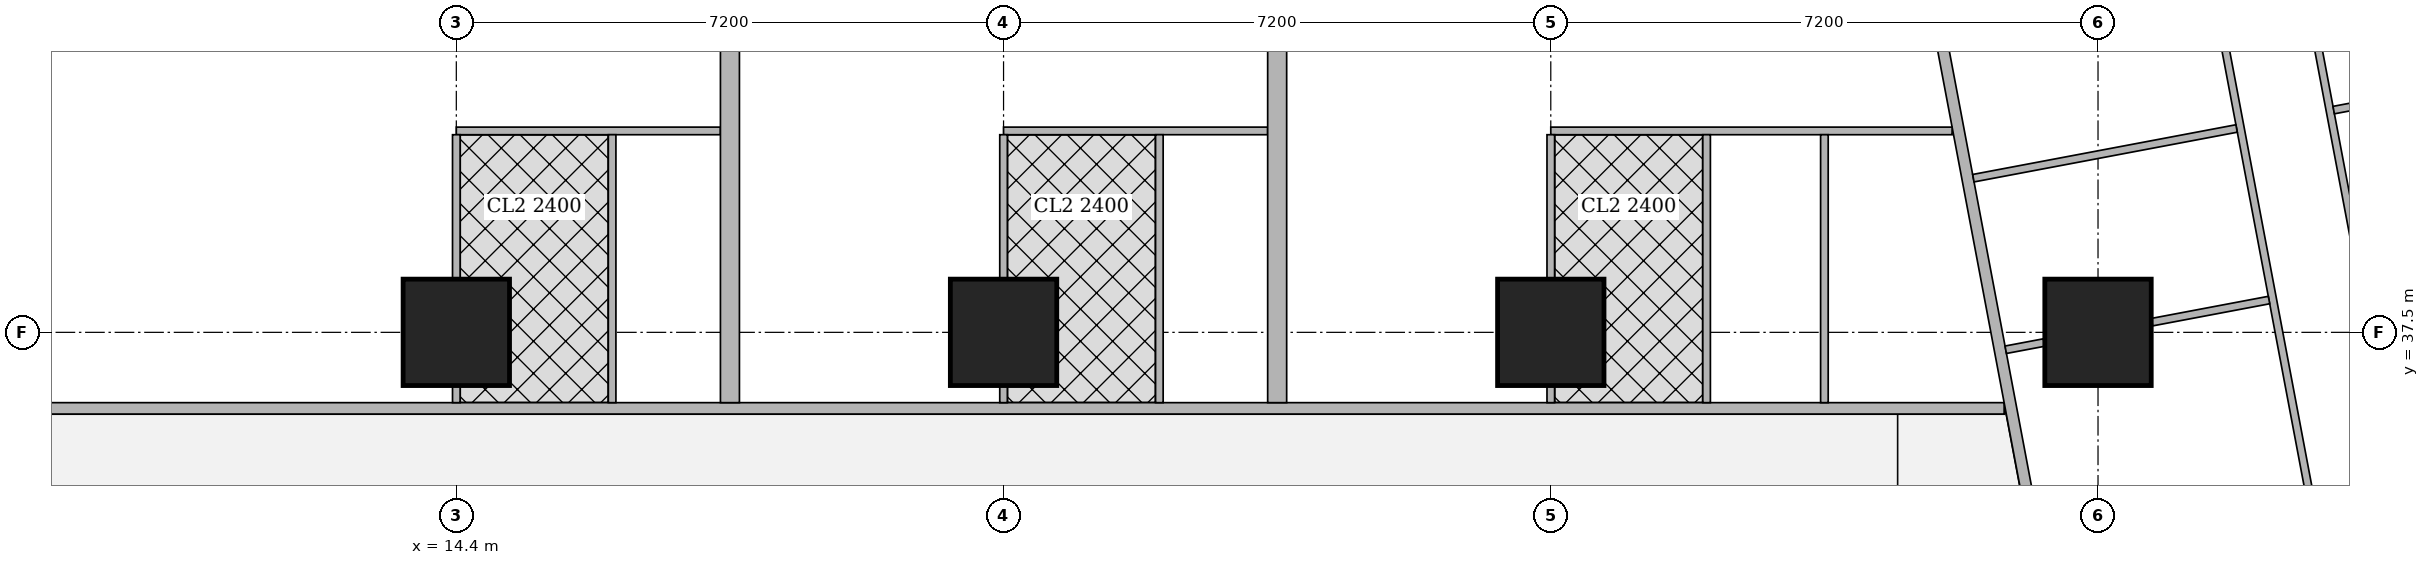
"""IFC4 building model, lengths in metres.
Left out: names, types, materials, properties, quantities, classifications, styles, units other than length and angle.
Written with IfcOpenShell. Run it as: python <this file> out.ifc"""

import sys

from ifc_helpers import new_model, si_unit, direction, frame, frame_2d, origin, origin_2d, place, context, subcontext, project, spatial, rectangle, extrude, element, fill, save


model = new_model("IFC4")
c1 = context("Model", 3, precision=1e-05, world=origin(), true_north=direction((0.0, 1.0)))
c2 = subcontext(c1, "Body", "Model", "MODEL_VIEW")
j1 = project(units=[si_unit("LENGTHUNIT", "METRE"), si_unit("PLANEANGLEUNIT", "RADIAN")], contexts=[c1])
p1 = place(None, origin())
s1 = spatial("IfcSite", under=j1, at=p1, CompositionType="ELEMENT")
p2 = place(p1, origin())
s2 = spatial("IfcBuilding", under=s1, at=p2, CompositionType="ELEMENT")
p3 = place(p2, frame((0.0, 0.0, 204.95)))
s3 = spatial("IfcBuildingStorey", under=s2, at=p3, CompositionType="ELEMENT", Elevation=204.95)
for number, where, z_axis, x_axis in (
    (1, (14.4, 37.5, 0.0), (0.0, 0.0, 1.0), (1.0, 0.0, 0.0)),
    (2, (21.6, 37.5, 0.0), (0.0, 0.0, 1.0), (1.0, 0.0, 0.0)),
    (3, (28.8, 37.5, 0.0), (0.0, 0.0, 1.0), (1.0, 0.0, 0.0)),
    (4, (36.0, 37.5, 0.0), (0.0, 0.0, 1.0), (1.0, 0.0, 0.0)),
):
    element("IfcColumn", number, at=place(p3, frame(where, z_axis=z_axis, x_axis=x_axis)), inside=s3, PredefinedType="COLUMN", context=c2, shape_type="SweptSolid", body=[
        extrude(rectangle(XDim=1.4, YDim=1.4, at=origin_2d()), origin(), (0.0, 0.0, 1.0), 3.75),
    ])
p4 = place(p3, frame((9.001, 36.5, 0.0), z_axis=(0.0, 0.0, 1.0), x_axis=(1.0, 0.0, 0.0)))
e5 = element("IfcWall", 5, at=p4, inside=s3, PredefinedType="SOLIDWALL", context=c2, shape_type="SweptSolid", body=[
    extrude(rectangle(XDim=25.764, YDim=0.15, at=frame_2d((12.882, 0.0))), origin(), (0.0, 0.0, 1.0), 3.5),
])
p5 = place(p4, frame((0.874, 0.0, 0.0)))
e6 = element("IfcOpeningElement", 6, at=p5, cuts=e5, PredefinedType="OPENING", context=c2, shape_type="SweptSolid", body=[
    extrude(rectangle(XDim=1.0, YDim=2.1, at=frame_2d((0.5, 1.05))), frame((0.0, 0.085, 0.0), z_axis=(0.0, -1.0, 0.0), x_axis=(1.0, 0.0, 0.0)), (0.0, 0.0, 1.0), 0.17),
])
p6 = place(p4, frame((10.099, 0.0, 0.0)))
e7 = element("IfcOpeningElement", 7, at=p6, cuts=e5, PredefinedType="OPENING", context=c2, shape_type="SweptSolid", body=[
    extrude(rectangle(XDim=1.0, YDim=2.1, at=frame_2d((0.5, 1.05))), frame((0.0, 0.085, 0.0), z_axis=(0.0, -1.0, 0.0), x_axis=(1.0, 0.0, 0.0)), (0.0, 0.0, 1.0), 0.17),
])
p7 = place(p4, frame((17.356, 0.0, 0.0)))
e8 = element("IfcOpeningElement", 8, at=p7, cuts=e5, PredefinedType="OPENING", context=c2, shape_type="SweptSolid", body=[
    extrude(rectangle(XDim=1.0, YDim=2.1, at=frame_2d((0.5, 1.05))), frame((0.0, 0.085, 0.0), z_axis=(0.0, -1.0, 0.0), x_axis=(1.0, 0.0, 0.0)), (0.0, 0.0, 1.0), 0.17),
])
p8 = place(p3, frame((33.68, 42.723, 0.0), z_axis=(0.0, 0.0, 1.0), x_axis=(0.185601160014, -0.982625162207, 0.0)))
e9 = element("IfcWall", 9, at=p8, inside=s3, PredefinedType="SOLIDWALL", context=c2, shape_type="SweptSolid", body=[
    extrude(rectangle(XDim=41.051, YDim=0.15, at=frame_2d((20.526, 0.0))), origin(), (0.0, 0.0, 1.0), 2.5),
])
p9 = place(p8, frame((12.307, 0.0, 0.0)))
e10 = element("IfcOpeningElement", 10, at=p9, cuts=e9, PredefinedType="OPENING", context=c2, shape_type="SweptSolid", body=[
    extrude(rectangle(XDim=1.0, YDim=2.1, at=frame_2d((0.5, 1.05))), frame((0.0, 0.085, 0.0), z_axis=(0.0, -1.0, 0.0), x_axis=(1.0, 0.0, 0.0)), (0.0, 0.0, 1.0), 0.17),
])
p10 = place(p8, frame((16.123, 0.0, 0.0)))
e11 = element("IfcOpeningElement", 11, at=p10, cuts=e9, PredefinedType="OPENING", context=c2, shape_type="SweptSolid", body=[
    extrude(rectangle(XDim=1.0, YDim=2.1, at=frame_2d((0.5, 1.05))), frame((0.0, 0.085, 0.0), z_axis=(0.0, -1.0, 0.0), x_axis=(1.0, 0.0, 0.0)), (0.0, 0.0, 1.0), 0.17),
])
p11 = place(p8, frame((30.902, 0.0, 0.0)))
e12 = element("IfcOpeningElement", 12, at=p11, cuts=e9, PredefinedType="OPENING", context=c2, shape_type="SweptSolid", body=[
    extrude(rectangle(XDim=1.0, YDim=2.1, at=frame_2d((0.5, 1.05))), frame((0.0, 0.085, 0.0), z_axis=(0.0, -1.0, 0.0), x_axis=(1.0, 0.0, 0.0)), (0.0, 0.0, 1.0), 0.17),
])
p12 = place(p3, frame((38.764, 41.941, 0.0), z_axis=(0.0, 0.0, 1.0), x_axis=(0.185548572312, -0.982635093671, 0.0)))
e13 = element("IfcWall", 13, at=p12, inside=s3, PredefinedType="PARTITIONING", context=c2, shape_type="SweptSolid", body=[
    extrude(rectangle(XDim=9.135, YDim=0.1, at=frame_2d((4.568, 0.0))), origin(), (0.0, 0.0, 1.0), 3.5),
])
p13 = place(p12, frame((8.085, 0.0, 0.0)))
e14 = element("IfcOpeningElement", 14, at=p13, cuts=e13, PredefinedType="OPENING", context=c2, shape_type="SweptSolid", body=[
    extrude(rectangle(XDim=0.9, YDim=2.1, at=frame_2d((0.45, 1.05))), frame((0.0, 0.06, 0.0), z_axis=(0.0, -1.0, 0.0), x_axis=(1.0, 0.0, 0.0)), (0.0, 0.0, 1.0), 0.12),
])
p14 = place(p12, frame((3.7, 0.0, 0.0)))
e15 = element("IfcOpeningElement", 15, at=p14, cuts=e13, PredefinedType="OPENING", context=c2, shape_type="SweptSolid", body=[
    extrude(rectangle(XDim=0.9, YDim=2.1, at=frame_2d((0.45, 1.05))), frame((0.0, 0.06, 0.0), z_axis=(0.0, -1.0, 0.0), x_axis=(1.0, 0.0, 0.0)), (0.0, 0.0, 1.0), 0.12),
])
p15 = place(p3, frame((37.473, 42.309, 0.0), z_axis=(0.0, 0.0, 1.0), x_axis=(0.185491912953, -0.982645790827, 0.0)))
e16 = element("IfcWall", 16, at=p15, inside=s3, PredefinedType="PARTITIONING", context=c2, shape_type="SweptSolid", body=[
    extrude(rectangle(XDim=9.737, YDim=0.1, at=frame_2d((4.869, 0.0))), origin(), (0.0, 0.0, 1.0), 3.5),
])
p16 = place(p15, frame((8.312, 0.0, 0.0)))
e17 = element("IfcOpeningElement", 17, at=p16, cuts=e16, PredefinedType="OPENING", context=c2, shape_type="SweptSolid", body=[
    extrude(rectangle(XDim=0.9, YDim=2.1, at=frame_2d((0.45, 1.05))), frame((0.0, 0.06, 0.0), z_axis=(0.0, -1.0, 0.0), x_axis=(1.0, 0.0, 0.0)), (0.0, 0.0, 1.0), 0.12),
])
p17 = place(p15, frame((2.853, 0.0, 0.0)))
e18 = element("IfcOpeningElement", 18, at=p17, cuts=e16, PredefinedType="OPENING", context=c2, shape_type="SweptSolid", body=[
    extrude(rectangle(XDim=0.9, YDim=2.1, at=frame_2d((0.45, 1.05))), frame((0.0, 0.06, 0.0), z_axis=(0.0, -1.0, 0.0), x_axis=(1.0, 0.0, 0.0)), (0.0, 0.0, 1.0), 0.12),
])
p18 = place(p15, frame((5.644, 0.0, 0.0)))
e19 = element("IfcOpeningElement", 19, at=p18, cuts=e16, PredefinedType="OPENING", context=c2, shape_type="SweptSolid", body=[
    extrude(rectangle(XDim=0.9, YDim=2.1, at=frame_2d((0.45, 1.05))), frame((0.0, 0.06, 0.0), z_axis=(0.0, -1.0, 0.0), x_axis=(1.0, 0.0, 0.0)), (0.0, 0.0, 1.0), 0.12),
])
p19 = place(p3, frame((43.277, 41.212, 0.0), z_axis=(0.0, 0.0, 1.0), x_axis=(-0.982665405803, -0.185387972203, 0.0)))
e20 = element("IfcWall", 20, at=p19, inside=s3, PredefinedType="PARTITIONING", context=c2, shape_type="SweptSolid", body=[
    extrude(rectangle(XDim=4.25, YDim=0.1, at=frame_2d((2.125, 0.0))), origin(), (0.0, 0.0, 1.0), 2.05),
])
p20 = place(p3, frame((37.823, 40.182, 0.0), z_axis=(0.0, 0.0, 1.0), x_axis=(-0.98263926043, -0.185526504472, 0.0)))
e21 = element("IfcWall", 21, at=p20, inside=s3, PredefinedType="PARTITIONING", context=c2, shape_type="SweptSolid", body=[
    extrude(rectangle(XDim=3.524, YDim=0.1, at=frame_2d((1.762, 0.0))), origin(), (0.0, 0.0, 1.0), 3.5),
])
p21 = place(p3, frame((38.25, 37.925, 0.0), z_axis=(0.0, 0.0, 1.0), x_axis=(-0.982610209589, -0.185680305934, 0.0)))
e22 = element("IfcWall", 22, at=p21, inside=s3, PredefinedType="PARTITIONING", context=c2, shape_type="SweptSolid", body=[
    extrude(rectangle(XDim=1.567, YDim=0.1, at=frame_2d((0.784, 0.0))), origin(), (0.0, 0.0, 1.0), 3.5),
])
p22 = place(p3, frame((35.29, 37.366, 0.0), z_axis=(0.0, 0.0, 1.0), x_axis=(-0.982715597703, -0.185121727606, 0.0)))
e23 = element("IfcWall", 23, at=p22, inside=s3, PredefinedType="PARTITIONING", context=c2, shape_type="SweptSolid", body=[
    extrude(rectangle(XDim=0.513, YDim=0.1, at=frame_2d((0.256, 0.0))), origin(), (0.0, 0.0, 1.0), 3.5),
])
p23 = place(p3, frame((14.4, 40.15, 0.0), z_axis=(0.0, 0.0, 1.0), x_axis=(1.0, 0.0, 0.0)))
e24 = element("IfcWall", 24, at=p23, inside=s3, PredefinedType="PARTITIONING", context=c2, shape_type="SweptSolid", body=[
    extrude(rectangle(XDim=3.475, YDim=0.1, at=frame_2d((1.738, 0.0))), origin(), (0.0, 0.0, 1.0), 3.5),
])
p24 = place(p23, frame((0.575, 0.0, 0.0)))
e25 = element("IfcOpeningElement", 25, at=p24, cuts=e24, PredefinedType="OPENING", context=c2, shape_type="SweptSolid", body=[
    extrude(rectangle(XDim=0.9, YDim=2.1, at=frame_2d((0.45, 1.05))), frame((0.0, 0.06, 0.0), z_axis=(0.0, -1.0, 0.0), x_axis=(1.0, 0.0, 0.0)), (0.0, 0.0, 1.0), 0.12),
])
p25 = place(p23, frame((2.375, 0.0, 0.0)))
e26 = element("IfcOpeningElement", 26, at=p25, cuts=e24, PredefinedType="OPENING", context=c2, shape_type="SweptSolid", body=[
    extrude(rectangle(XDim=0.9, YDim=2.1, at=frame_2d((0.45, 1.05))), frame((0.0, 0.06, 0.0), z_axis=(0.0, -1.0, 0.0), x_axis=(1.0, 0.0, 0.0)), (0.0, 0.0, 1.0), 0.12),
])
p26 = place(p3, frame((14.4, 36.575, 0.0), z_axis=(0.0, 0.0, 1.0), x_axis=(0.0, 1.0, 0.0)))
e27 = element("IfcWall", 27, at=p26, inside=s3, PredefinedType="PARTITIONING", context=c2, shape_type="SweptSolid", body=[
    extrude(rectangle(XDim=0.224, YDim=0.1, at=frame_2d((0.112, 0.0))), origin(), (0.0, 0.0, 1.0), 3.5),
])
p27 = place(p3, frame((14.4, 38.201, 0.0), z_axis=(0.0, 0.0, 1.0), x_axis=(0.0, 1.0, 0.0)))
e28 = element("IfcWall", 28, at=p27, inside=s3, PredefinedType="PARTITIONING", context=c2, shape_type="SweptSolid", body=[
    extrude(rectangle(XDim=1.899, YDim=0.1, at=frame_2d((0.95, 0.0))), origin(), (0.0, 0.0, 1.0), 3.5),
])
p28 = place(p3, frame((16.45, 36.575, 0.0), z_axis=(0.0, 0.0, 1.0), x_axis=(0.0, 1.0, 0.0)))
e29 = element("IfcWall", 29, at=p28, inside=s3, PredefinedType="PARTITIONING", context=c2, shape_type="SweptSolid", body=[
    extrude(rectangle(XDim=3.525, YDim=0.1, at=frame_2d((1.763, 0.0))), origin(), (0.0, 0.0, 1.0), 3.5),
])
p29 = place(p3, frame((21.6, 40.15, 0.0), z_axis=(0.0, 0.0, 1.0), x_axis=(1.0, 0.0, 0.0)))
e30 = element("IfcWall", 30, at=p29, inside=s3, PredefinedType="PARTITIONING", context=c2, shape_type="SweptSolid", body=[
    extrude(rectangle(XDim=3.475, YDim=0.1, at=frame_2d((1.737, 0.0))), origin(), (0.0, 0.0, 1.0), 3.5),
])
p30 = place(p29, frame((0.575, 0.0, 0.0)))
e31 = element("IfcOpeningElement", 31, at=p30, cuts=e30, PredefinedType="OPENING", context=c2, shape_type="SweptSolid", body=[
    extrude(rectangle(XDim=0.9, YDim=2.1, at=frame_2d((0.45, 1.05))), frame((0.0, 0.06, 0.0), z_axis=(0.0, -1.0, 0.0), x_axis=(1.0, 0.0, 0.0)), (0.0, 0.0, 1.0), 0.12),
])
p31 = place(p29, frame((2.375, 0.0, 0.0)))
e32 = element("IfcOpeningElement", 32, at=p31, cuts=e30, PredefinedType="OPENING", context=c2, shape_type="SweptSolid", body=[
    extrude(rectangle(XDim=0.9, YDim=2.1, at=frame_2d((0.45, 1.05))), frame((0.0, 0.06, 0.0), z_axis=(0.0, -1.0, 0.0), x_axis=(1.0, 0.0, 0.0)), (0.0, 0.0, 1.0), 0.12),
])
p32 = place(p3, frame((21.6, 36.575, 0.0), z_axis=(0.0, 0.0, 1.0), x_axis=(0.0, 1.0, 0.0)))
e33 = element("IfcWall", 33, at=p32, inside=s3, PredefinedType="PARTITIONING", context=c2, shape_type="SweptSolid", body=[
    extrude(rectangle(XDim=0.224, YDim=0.1, at=frame_2d((0.112, 0.0))), origin(), (0.0, 0.0, 1.0), 3.5),
])
p33 = place(p3, frame((21.6, 38.201, 0.0), z_axis=(0.0, 0.0, 1.0), x_axis=(0.0, 1.0, 0.0)))
e34 = element("IfcWall", 34, at=p33, inside=s3, PredefinedType="PARTITIONING", context=c2, shape_type="SweptSolid", body=[
    extrude(rectangle(XDim=1.899, YDim=0.1, at=frame_2d((0.95, 0.0))), origin(), (0.0, 0.0, 1.0), 3.5),
])
p34 = place(p3, frame((23.65, 36.575, 0.0), z_axis=(0.0, 0.0, 1.0), x_axis=(0.0, 1.0, 0.0)))
e35 = element("IfcWall", 35, at=p34, inside=s3, PredefinedType="PARTITIONING", context=c2, shape_type="SweptSolid", body=[
    extrude(rectangle(XDim=3.525, YDim=0.1, at=frame_2d((1.763, 0.0))), origin(), (0.0, 0.0, 1.0), 3.5),
])
p35 = place(p3, frame((18.0, 36.575, 0.0), z_axis=(0.0, 0.0, 1.0), x_axis=(0.0, 1.0, 0.0)))
e36 = element("IfcWall", 36, at=p35, inside=s3, PredefinedType="SOLIDWALL", context=c2, shape_type="SweptSolid", body=[
    extrude(rectangle(XDim=4.775, YDim=0.25, at=frame_2d((2.388, 0.0))), origin(), (0.0, 0.0, 1.0), 3.5),
])
p36 = place(p3, frame((28.8, 40.15, 0.0), z_axis=(0.0, 0.0, 1.0), x_axis=(1.0, 0.0, 0.0)))
e37 = element("IfcWall", 37, at=p36, inside=s3, PredefinedType="PARTITIONING", context=c2, shape_type="SweptSolid", body=[
    extrude(rectangle(XDim=5.28, YDim=0.1, at=frame_2d((2.64, 0.0))), origin(), (0.0, 0.0, 1.0), 3.5),
])
p37 = place(p36, frame((0.575, 0.0, 0.0)))
e38 = element("IfcOpeningElement", 38, at=p37, cuts=e37, PredefinedType="OPENING", context=c2, shape_type="SweptSolid", body=[
    extrude(rectangle(XDim=0.9, YDim=2.1, at=frame_2d((0.45, 1.05))), frame((0.0, 0.06, 0.0), z_axis=(0.0, -1.0, 0.0), x_axis=(1.0, 0.0, 0.0)), (0.0, 0.0, 1.0), 0.12),
])
p38 = place(p36, frame((4.23, 0.0, 0.0)))
e39 = element("IfcOpeningElement", 39, at=p38, cuts=e37, PredefinedType="OPENING", context=c2, shape_type="SweptSolid", body=[
    extrude(rectangle(XDim=0.9, YDim=2.1, at=frame_2d((0.45, 1.05))), frame((0.0, 0.06, 0.0), z_axis=(0.0, -1.0, 0.0), x_axis=(1.0, 0.0, 0.0)), (0.0, 0.0, 1.0), 0.12),
])
p39 = place(p36, frame((2.375, 0.0, 0.0)))
e40 = element("IfcOpeningElement", 40, at=p39, cuts=e37, PredefinedType="OPENING", context=c2, shape_type="SweptSolid", body=[
    extrude(rectangle(XDim=0.9, YDim=2.1, at=frame_2d((0.45, 1.05))), frame((0.0, 0.06, 0.0), z_axis=(0.0, -1.0, 0.0), x_axis=(1.0, 0.0, 0.0)), (0.0, 0.0, 1.0), 0.12),
])
p40 = place(p3, frame((28.8, 36.575, 0.0), z_axis=(0.0, 0.0, 1.0), x_axis=(0.0, 1.0, 0.0)))
e41 = element("IfcWall", 41, at=p40, inside=s3, PredefinedType="PARTITIONING", context=c2, shape_type="SweptSolid", body=[
    extrude(rectangle(XDim=0.224, YDim=0.1, at=frame_2d((0.112, 0.0))), origin(), (0.0, 0.0, 1.0), 3.5),
])
p41 = place(p3, frame((28.8, 38.201, 0.0), z_axis=(0.0, 0.0, 1.0), x_axis=(0.0, 1.0, 0.0)))
e42 = element("IfcWall", 42, at=p41, inside=s3, PredefinedType="PARTITIONING", context=c2, shape_type="SweptSolid", body=[
    extrude(rectangle(XDim=1.899, YDim=0.1, at=frame_2d((0.95, 0.0))), origin(), (0.0, 0.0, 1.0), 3.5),
])
for number, where, z_axis, x_axis in (
    (43, (32.4, 36.575, 0.0), (0.0, 0.0, 1.0), (0.0, 1.0, 0.0)),
    (44, (30.85, 36.575, 0.0), (0.0, 0.0, 1.0), (0.0, 1.0, 0.0)),
):
    element("IfcWall", number, at=place(p3, frame(where, z_axis=z_axis, x_axis=x_axis)), inside=s3, PredefinedType="PARTITIONING", context=c2, shape_type="SweptSolid", body=[
        extrude(rectangle(XDim=3.525, YDim=0.1, at=frame_2d((1.763, 0.0))), origin(), (0.0, 0.0, 1.0), 3.5),
    ])
p42 = place(p3, frame((25.2, 36.575, 0.0), z_axis=(0.0, 0.0, 1.0), x_axis=(0.0, 1.0, 0.0)))
e45 = element("IfcWall", 45, at=p42, inside=s3, PredefinedType="SOLIDWALL", context=c2, shape_type="SweptSolid", body=[
    extrude(rectangle(XDim=4.775, YDim=0.25, at=frame_2d((2.388, 0.0))), origin(), (0.0, 0.0, 1.0), 3.5),
])
p43 = place(p17, origin())
e46 = element("IfcDoor", 46, at=p43, inside=s3, OperationType="SINGLE_SWING_LEFT", PredefinedType="DOOR", context=c2, shape_type="SweptSolid", body=[
    extrude(rectangle(XDim=0.9, YDim=2.1, at=frame_2d((0.45, 1.05))), frame((0.0, 0.025, 0.0), z_axis=(0.0, -1.0, 0.0), x_axis=(1.0, 0.0, 0.0)), (0.0, 0.0, 1.0), 0.05),
])
fill(e18, e46)
p44 = place(p18, origin())
e47 = element("IfcDoor", 47, at=p44, inside=s3, OperationType="SINGLE_SWING_LEFT", PredefinedType="DOOR", context=c2, shape_type="SweptSolid", body=[
    extrude(rectangle(XDim=0.9, YDim=2.1, at=frame_2d((0.45, 1.05))), frame((0.0, 0.025, 0.0), z_axis=(0.0, -1.0, 0.0), x_axis=(1.0, 0.0, 0.0)), (0.0, 0.0, 1.0), 0.05),
])
fill(e19, e47)
p45 = place(p24, origin())
e48 = element("IfcDoor", 48, at=p45, inside=s3, OperationType="SINGLE_SWING_RIGHT", PredefinedType="DOOR", context=c2, shape_type="SweptSolid", body=[
    extrude(rectangle(XDim=0.9, YDim=2.1, at=frame_2d((0.45, 1.05))), frame((0.0, 0.025, 0.0), z_axis=(0.0, -1.0, 0.0), x_axis=(1.0, 0.0, 0.0)), (0.0, 0.0, 1.0), 0.05),
])
fill(e25, e48)
p46 = place(p25, origin())
e49 = element("IfcDoor", 49, at=p46, inside=s3, OperationType="SINGLE_SWING_LEFT", PredefinedType="DOOR", context=c2, shape_type="SweptSolid", body=[
    extrude(rectangle(XDim=0.9, YDim=2.1, at=frame_2d((0.45, 1.05))), frame((0.0, 0.025, 0.0), z_axis=(0.0, -1.0, 0.0), x_axis=(1.0, 0.0, 0.0)), (0.0, 0.0, 1.0), 0.05),
])
fill(e26, e49)
p47 = place(p5, origin())
e50 = element("IfcDoor", 50, at=p47, inside=s3, OperationType="SINGLE_SWING_LEFT", PredefinedType="DOOR", context=c2, shape_type="SweptSolid", body=[
    extrude(rectangle(XDim=1.0, YDim=2.1, at=frame_2d((0.5, 1.05))), frame((0.0, 0.025, 0.0), z_axis=(0.0, -1.0, 0.0), x_axis=(1.0, 0.0, 0.0)), (0.0, 0.0, 1.0), 0.05),
])
fill(e6, e50)
p48 = place(p30, origin())
e51 = element("IfcDoor", 51, at=p48, inside=s3, OperationType="SINGLE_SWING_RIGHT", PredefinedType="DOOR", context=c2, shape_type="SweptSolid", body=[
    extrude(rectangle(XDim=0.9, YDim=2.1, at=frame_2d((0.45, 1.05))), frame((0.0, 0.025, 0.0), z_axis=(0.0, -1.0, 0.0), x_axis=(1.0, 0.0, 0.0)), (0.0, 0.0, 1.0), 0.05),
])
fill(e31, e51)
p49 = place(p31, origin())
e52 = element("IfcDoor", 52, at=p49, inside=s3, OperationType="SINGLE_SWING_LEFT", PredefinedType="DOOR", context=c2, shape_type="SweptSolid", body=[
    extrude(rectangle(XDim=0.9, YDim=2.1, at=frame_2d((0.45, 1.05))), frame((0.0, 0.025, 0.0), z_axis=(0.0, -1.0, 0.0), x_axis=(1.0, 0.0, 0.0)), (0.0, 0.0, 1.0), 0.05),
])
fill(e32, e52)
p50 = place(p6, origin())
e53 = element("IfcDoor", 53, at=p50, inside=s3, OperationType="SINGLE_SWING_LEFT", PredefinedType="DOOR", context=c2, shape_type="SweptSolid", body=[
    extrude(rectangle(XDim=1.0, YDim=2.1, at=frame_2d((0.5, 1.05))), frame((0.0, 0.025, 0.0), z_axis=(0.0, -1.0, 0.0), x_axis=(1.0, 0.0, 0.0)), (0.0, 0.0, 1.0), 0.05),
])
fill(e7, e53)
p51 = place(p37, origin())
e54 = element("IfcDoor", 54, at=p51, inside=s3, OperationType="SINGLE_SWING_RIGHT", PredefinedType="DOOR", context=c2, shape_type="SweptSolid", body=[
    extrude(rectangle(XDim=0.9, YDim=2.1, at=frame_2d((0.45, 1.05))), frame((0.0, 0.025, 0.0), z_axis=(0.0, -1.0, 0.0), x_axis=(1.0, 0.0, 0.0)), (0.0, 0.0, 1.0), 0.05),
])
fill(e38, e54)
p52 = place(p38, origin())
e55 = element("IfcDoor", 55, at=p52, inside=s3, OperationType="SINGLE_SWING_LEFT", PredefinedType="DOOR", context=c2, shape_type="SweptSolid", body=[
    extrude(rectangle(XDim=0.9, YDim=2.1, at=frame_2d((0.45, 1.05))), frame((0.0, 0.025, 0.0), z_axis=(0.0, -1.0, 0.0), x_axis=(1.0, 0.0, 0.0)), (0.0, 0.0, 1.0), 0.05),
])
fill(e39, e55)
p53 = place(p39, origin())
e56 = element("IfcDoor", 56, at=p53, inside=s3, OperationType="SINGLE_SWING_LEFT", PredefinedType="DOOR", context=c2, shape_type="SweptSolid", body=[
    extrude(rectangle(XDim=0.9, YDim=2.1, at=frame_2d((0.45, 1.05))), frame((0.0, 0.025, 0.0), z_axis=(0.0, -1.0, 0.0), x_axis=(1.0, 0.0, 0.0)), (0.0, 0.0, 1.0), 0.05),
])
fill(e40, e56)
p54 = place(p7, origin())
e57 = element("IfcDoor", 57, at=p54, inside=s3, OperationType="SINGLE_SWING_LEFT", PredefinedType="DOOR", context=c2, shape_type="SweptSolid", body=[
    extrude(rectangle(XDim=1.0, YDim=2.1, at=frame_2d((0.5, 1.05))), frame((0.0, 0.025, 0.0), z_axis=(0.0, -1.0, 0.0), x_axis=(1.0, 0.0, 0.0)), (0.0, 0.0, 1.0), 0.05),
])
fill(e8, e57)
save(model, sys.argv[1])
